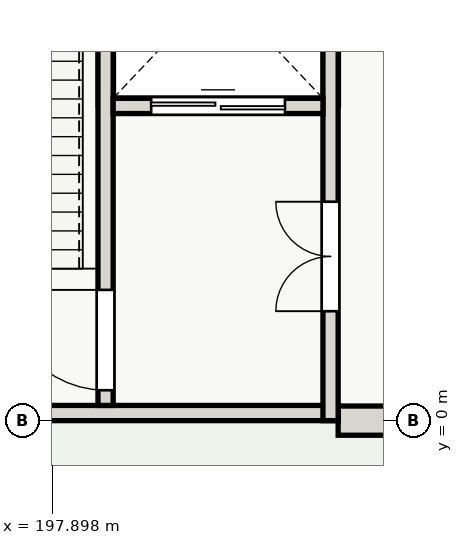
"""IFC4 building model, lengths in metres.
Left out: names, types, materials, properties, quantities, classifications, styles, units other than length and angle.
Written with IfcOpenShell. Run it as: python <this file> out.ifc"""

import sys

from ifc_helpers import new_model, si_unit, direction, frame, frame_2d, origin, place, context, subcontext, project, spatial, rectangle, extrude, element, fill, save


model = new_model("IFC4")
c1 = context("Model", 3, precision=1e-05, world=origin(), true_north=direction((0.0, 1.0)))
c2 = subcontext(c1, "Body", "Model", "MODEL_VIEW")
j1 = project(units=[si_unit("LENGTHUNIT", "METRE"), si_unit("PLANEANGLEUNIT", "RADIAN")], contexts=[c1])
p1 = place(None, origin())
s1 = spatial("IfcSite", under=j1, at=p1, CompositionType="ELEMENT")
p2 = place(p1, origin())
s2 = spatial("IfcBuilding", under=s1, at=p2, CompositionType="ELEMENT")
p3 = place(p2, origin())
s3 = spatial("IfcBuildingStorey", under=s2, at=p3, CompositionType="ELEMENT", Elevation=0.0)
p4 = place(p3, frame((204.0, 0.0, 0.0), z_axis=(0.0, 0.0, 1.0), x_axis=(-1.0, 0.0, 0.0)))
e1 = element("IfcWall", 1, at=p4, inside=s3, PredefinedType="SOLIDWALL", context=c2, shape_type="SweptSolid", body=[
    extrude(rectangle(XDim=1.4, YDim=0.48, at=frame_2d((0.7, 0.0))), origin(), (0.0, 0.0, 1.0), 3.58),
])
p5 = place(p3, frame((198.78, 5.18, -1.6), z_axis=(0.0, 0.0, 1.0), x_axis=(1.0, 0.0, 0.0)))
e2 = element("IfcWall", 2, at=p5, inside=s3, PredefinedType="SHEAR", context=c2, shape_type="SweptSolid", body=[
    extrude(rectangle(XDim=3.7, YDim=0.25, at=frame_2d((1.85, 0.0))), origin(), (0.0, 0.0, 1.0), 1.6),
])
for number, where, z_axis, x_axis in (
    (3, (202.48, 5.18, -1.6), (0.0, 0.0, 1.0), (0.0, 1.0, 0.0)),
    (4, (198.78, 9.08, -1.6), (0.0, 0.0, 1.0), (0.0, -1.0, 0.0)),
):
    element("IfcWall", number, at=place(p3, frame(where, z_axis=z_axis, x_axis=x_axis)), inside=s3, PredefinedType="SHEAR", context=c2, shape_type="SweptSolid", body=[
        extrude(rectangle(XDim=3.9, YDim=0.25, at=frame_2d((1.95, 0.0))), origin(), (0.0, 0.0, 1.0), 1.6),
    ])
p6 = place(p3, frame((202.6, 0.125, 0.0), z_axis=(0.0, 0.0, 1.0), x_axis=(-1.0, 0.0, 0.0)))
e5 = element("IfcWall", 5, at=p6, inside=s3, PredefinedType="SHEAR", context=c2, shape_type="SweptSolid", body=[
    extrude(rectangle(XDim=9.2, YDim=0.25, at=frame_2d((4.6, 0.0))), origin(), (0.0, 0.0, 1.0), 4.2),
])
p7 = place(p6, frame((5.9, 0.0, 0.0)))
e6 = element("IfcOpeningElement", 6, at=p7, cuts=e5, PredefinedType="OPENING", context=c2, shape_type="SweptSolid", body=[
    extrude(rectangle(XDim=1.9, YDim=2.2, at=frame_2d((0.95, 1.1))), frame((0.0, 0.135, 0.0), z_axis=(0.0, -1.0, 0.0), x_axis=(1.0, 0.0, 0.0)), (0.0, 0.0, 1.0), 0.27),
])
p8 = place(p3, frame((202.475, 0.0, 0.0), z_axis=(0.0, 0.0, 1.0), x_axis=(0.0, 1.0, 0.0)))
e7 = element("IfcWall", 7, at=p8, inside=s3, PredefinedType="SHEAR", context=c2, shape_type="SweptSolid", body=[
    extrude(rectangle(XDim=9.2, YDim=0.25, at=frame_2d((4.6, 0.0))), origin(), (0.0, 0.0, 1.0), 4.2),
])
p9 = place(p8, frame((1.8, 0.0, 0.0)))
e8 = element("IfcOpeningElement", 8, at=p9, cuts=e7, PredefinedType="OPENING", context=c2, shape_type="SweptSolid", body=[
    extrude(rectangle(XDim=1.8, YDim=2.15, at=frame_2d((0.9, 1.075))), frame((0.0, 0.135, 0.0), z_axis=(0.0, -1.0, 0.0), x_axis=(1.0, 0.0, 0.0)), (0.0, 0.0, 1.0), 0.27),
])
p10 = place(p3, frame((198.775, 0.25, 0.0), z_axis=(0.0, 0.0, 1.0), x_axis=(0.0, 1.0, 0.0)))
e9 = element("IfcWall", 9, at=p10, inside=s3, PredefinedType="SHEAR", context=c2, shape_type="SweptSolid", body=[
    extrude(rectangle(XDim=8.7, YDim=0.25, at=frame_2d((4.35, 0.0))), origin(), (0.0, 0.0, 1.0), 4.2),
])
p11 = place(p10, frame((0.25, 0.0, 0.0)))
e10 = element("IfcOpeningElement", 10, at=p11, cuts=e9, PredefinedType="OPENING", context=c2, shape_type="SweptSolid", body=[
    extrude(rectangle(XDim=1.65, YDim=2.1, at=frame_2d((0.825, 1.05))), frame((0.0, 0.135, 0.0), z_axis=(0.0, -1.0, 0.0), x_axis=(1.0, 0.0, 0.0)), (0.0, 0.0, 1.0), 0.27),
])
p12 = place(p3, frame((198.9, 5.175, 0.0), z_axis=(0.0, 0.0, 1.0), x_axis=(1.0, 0.0, 0.0)))
e11 = element("IfcWall", 11, at=p12, inside=s3, PredefinedType="SHEAR", context=c2, shape_type="SweptSolid", body=[
    extrude(rectangle(XDim=3.45, YDim=0.25, at=frame_2d((1.725, 0.0))), origin(), (0.0, 0.0, 1.0), 4.2),
])
p13 = place(p12, frame((0.625, 0.0, 0.0)))
e12 = element("IfcOpeningElement", 12, at=p13, cuts=e11, PredefinedType="OPENING", context=c2, shape_type="SweptSolid", body=[
    extrude(rectangle(XDim=2.2, YDim=2.35, at=frame_2d((1.1, 1.175))), frame((0.0, 0.135, 0.0), z_axis=(0.0, -1.0, 0.0), x_axis=(1.0, 0.0, 0.0)), (0.0, 0.0, 1.0), 0.27),
])
p14 = place(p9, origin())
e13 = element("IfcDoor", 13, at=p14, inside=s3, OperationType="DOUBLE_DOOR_SINGLE_SWING", PredefinedType="DOOR", context=c2, shape_type="SweptSolid", body=[
    extrude(rectangle(XDim=1.8, YDim=2.15, at=frame_2d((0.9, 1.075))), frame((0.0, 0.025, 0.0), z_axis=(0.0, -1.0, 0.0), x_axis=(1.0, 0.0, 0.0)), (0.0, 0.0, 1.0), 0.05),
])
fill(e8, e13)
p15 = place(p11, origin())
e14 = element("IfcDoor", 14, at=p15, inside=s3, OperationType="SINGLE_SWING_RIGHT", PredefinedType="DOOR", context=c2, shape_type="SweptSolid", body=[
    extrude(rectangle(XDim=1.65, YDim=2.1, at=frame_2d((0.825, 1.05))), frame((0.0, 0.025, 0.0), z_axis=(0.0, -1.0, 0.0), x_axis=(1.0, 0.0, 0.0)), (0.0, 0.0, 1.0), 0.05),
])
fill(e10, e14)
p16 = place(p13, origin())
e15 = element("IfcDoor", 15, at=p16, inside=s3, OperationType="SLIDING_TO_LEFT", PredefinedType="DOOR", context=c2, shape_type="SweptSolid", body=[
    extrude(rectangle(XDim=2.2, YDim=2.35, at=frame_2d((1.1, 1.175))), frame((0.0, 0.025, 0.0), z_axis=(0.0, -1.0, 0.0), x_axis=(1.0, 0.0, 0.0)), (0.0, 0.0, 1.0), 0.05),
])
fill(e12, e15)
save(model, sys.argv[1])
